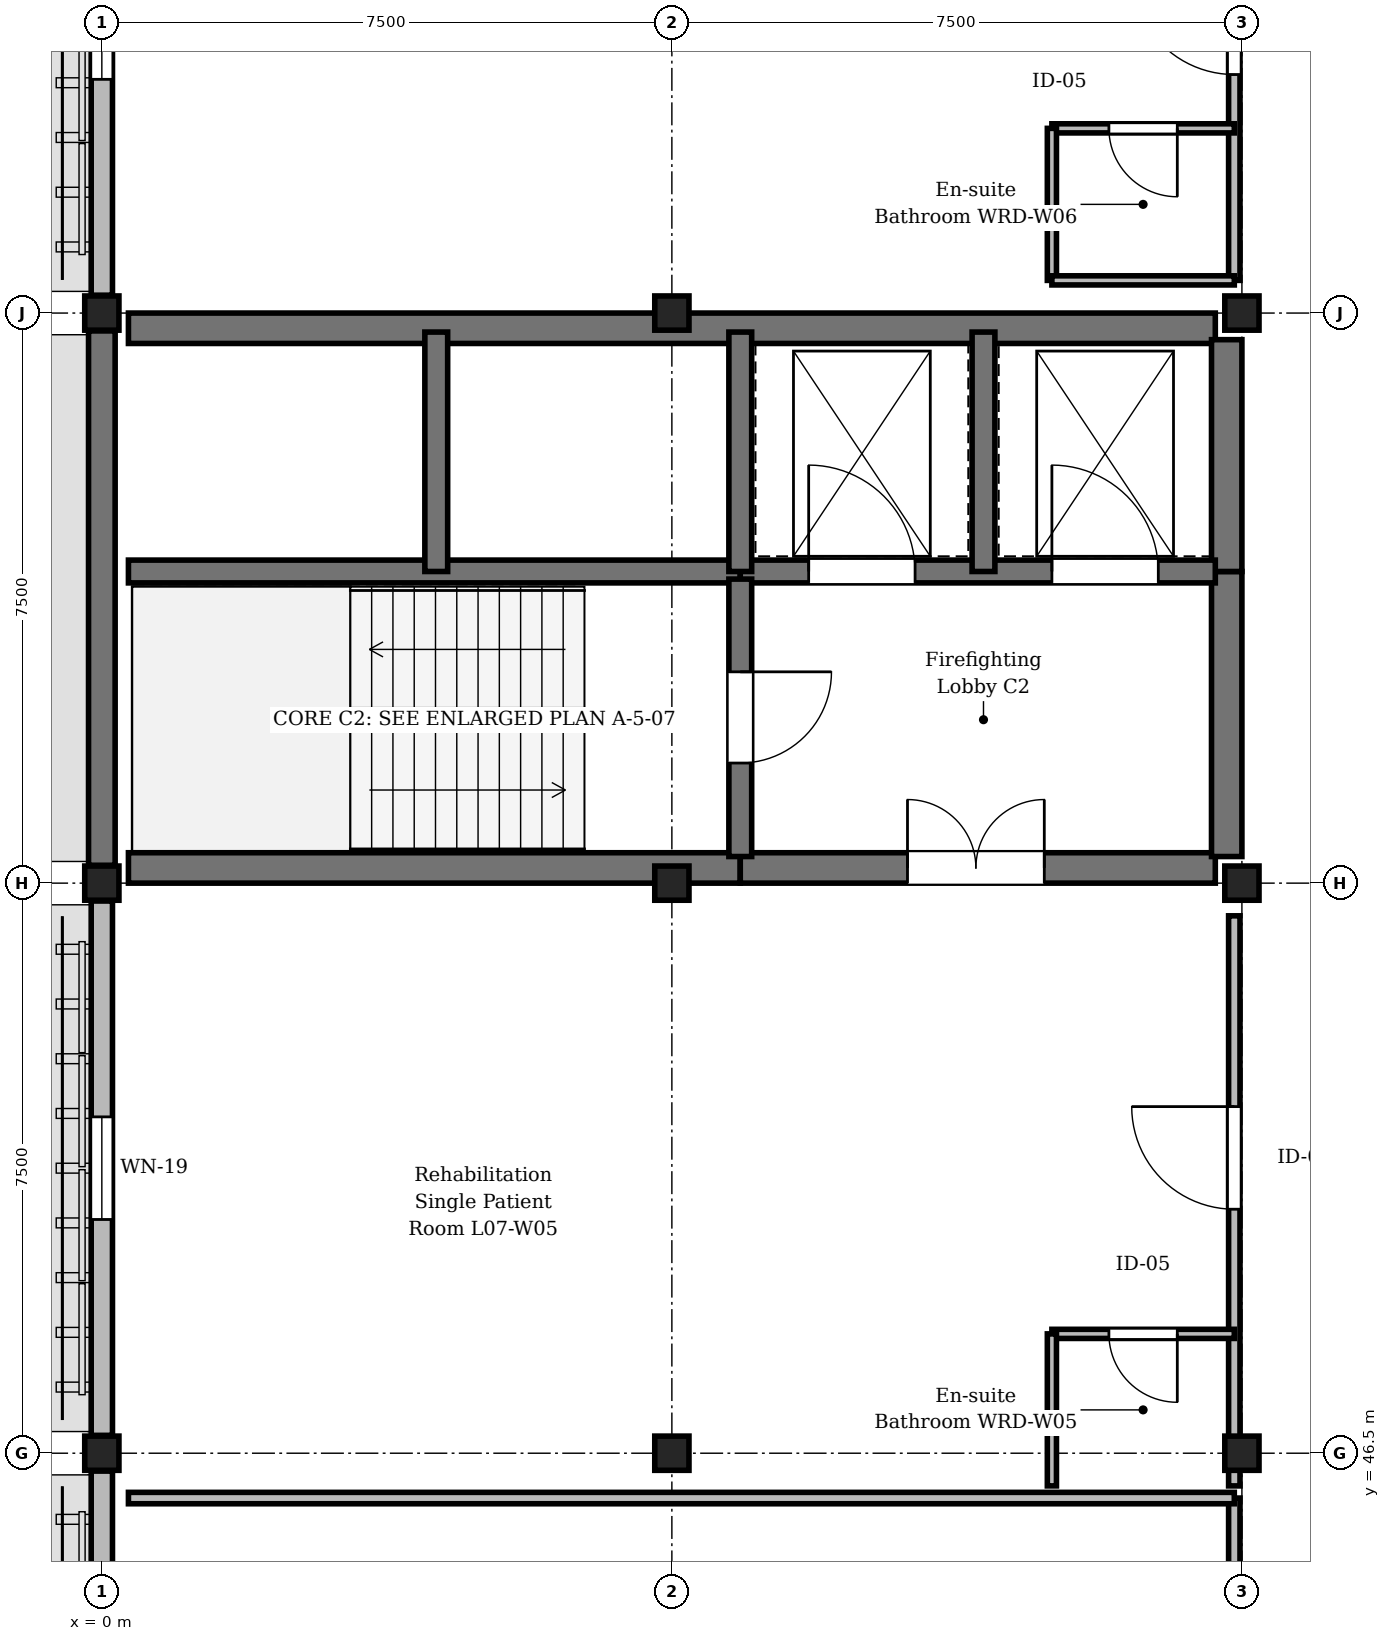
"""IFC4 building model, lengths in metres.
Left out: names, types, materials, properties, quantities, classifications, styles, units other than length and angle.
Written with IfcOpenShell. Run it as: python <this file> out.ifc"""

import sys

from ifc_helpers import new_model, si_unit, direction, frame, frame_2d, origin, origin_2d, place, context, subcontext, project, spatial, rectangle, extrude, element, fill, save


model = new_model("IFC4")
c1 = context("Model", 3, precision=1e-05, world=origin(), true_north=direction((0.0, 1.0)))
c2 = subcontext(c1, "Body", "Model", "MODEL_VIEW")
j1 = project(units=[si_unit("LENGTHUNIT", "METRE"), si_unit("PLANEANGLEUNIT", "RADIAN")], contexts=[c1])
p1 = place(None, origin())
s1 = spatial("IfcSite", under=j1, at=p1, CompositionType="ELEMENT")
p2 = place(p1, origin())
s2 = spatial("IfcBuilding", under=s1, at=p2, CompositionType="ELEMENT")
p3 = place(p2, frame((0.0, 0.0, 30.0)))
s3 = spatial("IfcBuildingStorey", under=s2, at=p3, CompositionType="ELEMENT", Elevation=30.0)
for number, where, z_axis, x_axis in (
    (1, (0.0, 46.5, 0.0), (0.0, 0.0, 1.0), (1.0, 0.0, 0.0)),
    (2, (0.0, 54.0, 0.0), (0.0, 0.0, 1.0), (1.0, 0.0, 0.0)),
    (3, (0.0, 61.5, 0.0), (0.0, 0.0, 1.0), (1.0, 0.0, 0.0)),
    (4, (7.5, 46.5, 0.0), (0.0, 0.0, 1.0), (1.0, 0.0, 0.0)),
    (5, (7.5, 54.0, 0.0), (0.0, 0.0, 1.0), (1.0, 0.0, 0.0)),
    (6, (7.5, 61.5, 0.0), (0.0, 0.0, 1.0), (1.0, 0.0, 0.0)),
    (7, (15.0, 46.5, 0.0), (0.0, 0.0, 1.0), (1.0, 0.0, 0.0)),
    (8, (15.0, 54.0, 0.0), (0.0, 0.0, 1.0), (1.0, 0.0, 0.0)),
    (9, (15.0, 61.5, 0.0), (0.0, 0.0, 1.0), (1.0, 0.0, 0.0)),
):
    element("IfcColumn", number, at=place(p3, frame(where, z_axis=z_axis, x_axis=x_axis)), inside=s3, PredefinedType="COLUMN", context=c2, shape_type="SweptSolid", body=[
        extrude(rectangle(XDim=0.45, YDim=0.45, at=origin_2d()), origin(), (0.0, 0.0, 1.0), 4.05),
    ])
p4 = place(p3, frame((0.0, 39.235, 0.0), z_axis=(0.0, 0.0, 1.0), x_axis=(0.0, 1.0, 0.0)))
e10 = element("IfcWall", 10, at=p4, inside=s3, PredefinedType="STANDARD", context=c2, shape_type="SweptSolid", body=[
    extrude(rectangle(XDim=7.03, YDim=0.28, at=frame_2d((3.515, 0.0))), origin(), (0.0, 0.0, 1.0), 3.83),
])
p5 = place(p4, frame((2.69, 0.0, 0.85)))
e11 = element("IfcOpeningElement", 11, at=p5, cuts=e10, PredefinedType="OPENING", context=c2, shape_type="SweptSolid", body=[
    extrude(rectangle(XDim=1.65, YDim=2.25, at=frame_2d((0.825, 1.125))), frame((0.0, 0.15, 0.0), z_axis=(0.0, -1.0, 0.0), x_axis=(1.0, 0.0, 0.0)), (0.0, 0.0, 1.0), 0.3),
])
p6 = place(p3, frame((0.0, 46.735, 0.0), z_axis=(0.0, 0.0, 1.0), x_axis=(0.0, 1.0, 0.0)))
e12 = element("IfcWall", 12, at=p6, inside=s3, PredefinedType="STANDARD", context=c2, shape_type="SweptSolid", body=[
    extrude(rectangle(XDim=7.03, YDim=0.28, at=frame_2d((3.515, 0.0))), origin(), (0.0, 0.0, 1.0), 3.83),
])
p7 = place(p6, frame((2.84, 0.0, 0.85)))
e13 = element("IfcOpeningElement", 13, at=p7, cuts=e12, PredefinedType="OPENING", context=c2, shape_type="SweptSolid", body=[
    extrude(rectangle(XDim=1.35, YDim=2.25, at=frame_2d((0.675, 1.125))), frame((0.0, 0.15, 0.0), z_axis=(0.0, -1.0, 0.0), x_axis=(1.0, 0.0, 0.0)), (0.0, 0.0, 1.0), 0.3),
])
p8 = place(p3, frame((0.0, 54.235, 0.0), z_axis=(0.0, 0.0, 1.0), x_axis=(0.0, 1.0, 0.0)))
e14 = element("IfcWall", 14, at=p8, inside=s3, PredefinedType="SHEAR", context=c2, shape_type="SweptSolid", body=[
    extrude(rectangle(XDim=7.03, YDim=0.35, at=frame_2d((3.515, 0.0))), origin(), (0.0, 0.0, 1.0), 3.83),
])
p9 = place(p3, frame((0.0, 61.735, 0.0), z_axis=(0.0, 0.0, 1.0), x_axis=(0.0, 1.0, 0.0)))
e15 = element("IfcWall", 15, at=p9, inside=s3, PredefinedType="STANDARD", context=c2, shape_type="SweptSolid", body=[
    extrude(rectangle(XDim=7.03, YDim=0.28, at=frame_2d((3.515, 0.0))), origin(), (0.0, 0.0, 1.0), 3.83),
])
p10 = place(p9, frame((2.84, 0.0, 0.85)))
e16 = element("IfcOpeningElement", 16, at=p10, cuts=e15, PredefinedType="OPENING", context=c2, shape_type="SweptSolid", body=[
    extrude(rectangle(XDim=1.35, YDim=2.25, at=frame_2d((0.675, 1.125))), frame((0.0, 0.15, 0.0), z_axis=(0.0, -1.0, 0.0), x_axis=(1.0, 0.0, 0.0)), (0.0, 0.0, 1.0), 0.3),
])
p11 = place(p3, frame((0.35, 54.2, 0.0), z_axis=(0.0, 0.0, 1.0), x_axis=(1.0, 0.0, 0.0)))
e17 = element("IfcWall", 17, at=p11, inside=s3, PredefinedType="SHEAR", context=c2, shape_type="SweptSolid", body=[
    extrude(rectangle(XDim=8.05, YDim=0.4, at=frame_2d((4.025, 0.0))), origin(), (0.0, 0.0, 1.0), 3.83),
])
p12 = place(p3, frame((8.4, 54.2, 0.0), z_axis=(0.0, 0.0, 1.0), x_axis=(1.0, 0.0, 0.0)))
e18 = element("IfcWall", 18, at=p12, inside=s3, PredefinedType="SHEAR", context=c2, shape_type="SweptSolid", body=[
    extrude(rectangle(XDim=6.25, YDim=0.4, at=frame_2d((3.125, 0.0))), origin(), (0.0, 0.0, 1.0), 3.83),
])
p13 = place(p12, frame((2.2, 0.0, 0.0)))
e19 = element("IfcOpeningElement", 19, at=p13, cuts=e18, PredefinedType="OPENING", context=c2, shape_type="SweptSolid", body=[
    extrude(rectangle(XDim=1.8, YDim=2.25, at=frame_2d((0.9, 1.125))), frame((0.0, 0.21, 0.0), z_axis=(0.0, -1.0, 0.0), x_axis=(1.0, 0.0, 0.0)), (0.0, 0.0, 1.0), 0.42),
])
p14 = place(p3, frame((0.35, 61.3, 0.0), z_axis=(0.0, 0.0, 1.0), x_axis=(1.0, 0.0, 0.0)))
e20 = element("IfcWall", 20, at=p14, inside=s3, PredefinedType="SHEAR", context=c2, shape_type="SweptSolid", body=[
    extrude(rectangle(XDim=14.3, YDim=0.4, at=frame_2d((7.15, 0.0))), origin(), (0.0, 0.0, 1.0), 3.83),
])
p15 = place(p3, frame((14.8, 54.35, 0.0), z_axis=(0.0, 0.0, 1.0), x_axis=(0.0, 1.0, 0.0)))
e21 = element("IfcWall", 21, at=p15, inside=s3, PredefinedType="SHEAR", context=c2, shape_type="SweptSolid", body=[
    extrude(rectangle(XDim=3.75, YDim=0.4, at=frame_2d((1.875, 0.0))), origin(), (0.0, 0.0, 1.0), 3.83),
])
p16 = place(p3, frame((14.8, 58.1, 0.0), z_axis=(0.0, 0.0, 1.0), x_axis=(0.0, 1.0, 0.0)))
e22 = element("IfcWall", 22, at=p16, inside=s3, PredefinedType="SHEAR", context=c2, shape_type="SweptSolid", body=[
    extrude(rectangle(XDim=3.05, YDim=0.4, at=frame_2d((1.525, 0.0))), origin(), (0.0, 0.0, 1.0), 3.83),
])
p17 = place(p3, frame((0.35, 58.1, 0.0), z_axis=(0.0, 0.0, 1.0), x_axis=(1.0, 0.0, 0.0)))
e23 = element("IfcWall", 23, at=p17, inside=s3, PredefinedType="SHEAR", context=c2, shape_type="SweptSolid", body=[
    extrude(rectangle(XDim=8.05, YDim=0.3, at=frame_2d((4.025, 0.0))), origin(), (0.0, 0.0, 1.0), 3.83),
])
p18 = place(p3, frame((8.4, 58.1, 0.0), z_axis=(0.0, 0.0, 1.0), x_axis=(1.0, 0.0, 0.0)))
e24 = element("IfcWall", 24, at=p18, inside=s3, PredefinedType="SHEAR", context=c2, shape_type="SweptSolid", body=[
    extrude(rectangle(XDim=6.25, YDim=0.3, at=frame_2d((3.125, 0.0))), origin(), (0.0, 0.0, 1.0), 3.83),
])
p19 = place(p18, frame((0.9, 0.0, 0.0)))
e25 = element("IfcOpeningElement", 25, at=p19, cuts=e24, PredefinedType="OPENING", context=c2, shape_type="SweptSolid", body=[
    extrude(rectangle(XDim=1.4, YDim=2.25, at=frame_2d((0.7, 1.125))), frame((0.0, 0.16, 0.0), z_axis=(0.0, -1.0, 0.0), x_axis=(1.0, 0.0, 0.0)), (0.0, 0.0, 1.0), 0.32),
])
p20 = place(p18, frame((4.1, 0.0, 0.0)))
e26 = element("IfcOpeningElement", 26, at=p20, cuts=e24, PredefinedType="OPENING", context=c2, shape_type="SweptSolid", body=[
    extrude(rectangle(XDim=1.4, YDim=2.25, at=frame_2d((0.7, 1.125))), frame((0.0, 0.16, 0.0), z_axis=(0.0, -1.0, 0.0), x_axis=(1.0, 0.0, 0.0)), (0.0, 0.0, 1.0), 0.32),
])
p21 = place(p3, frame((8.4, 58.0, 0.0), z_axis=(0.0, 0.0, 1.0), x_axis=(0.0, -1.0, 0.0)))
e27 = element("IfcWall", 27, at=p21, inside=s3, PredefinedType="SHEAR", context=c2, shape_type="SweptSolid", body=[
    extrude(rectangle(XDim=3.65, YDim=0.3, at=frame_2d((1.825, 0.0))), origin(), (0.0, 0.0, 1.0), 3.83),
])
p22 = place(p21, frame((1.22, 0.0, 0.0)))
e28 = element("IfcOpeningElement", 28, at=p22, cuts=e27, PredefinedType="OPENING", context=c2, shape_type="SweptSolid", body=[
    extrude(rectangle(XDim=1.2, YDim=2.25, at=frame_2d((0.6, 1.125))), frame((0.0, 0.16, 0.0), z_axis=(0.0, -1.0, 0.0), x_axis=(1.0, 0.0, 0.0)), (0.0, 0.0, 1.0), 0.32),
])
for number, where, z_axis, x_axis in (
    (29, (4.4, 58.1, 0.0), (0.0, 0.0, 1.0), (0.0, 1.0, 0.0)),
    (30, (8.4, 58.1, 0.0), (0.0, 0.0, 1.0), (0.0, 1.0, 0.0)),
    (31, (11.6, 58.1, 0.0), (0.0, 0.0, 1.0), (0.0, 1.0, 0.0)),
):
    element("IfcWall", number, at=place(p3, frame(where, z_axis=z_axis, x_axis=x_axis)), inside=s3, PredefinedType="SHEAR", context=c2, shape_type="SweptSolid", body=[
        extrude(rectangle(XDim=3.15, YDim=0.3, at=frame_2d((1.575, 0.0))), origin(), (0.0, 0.0, 1.0), 3.83),
    ])
p23 = place(p3, frame((14.9, 38.41, 0.0), z_axis=(0.0, 0.0, 1.0), x_axis=(0.0, 1.0, 0.0)))
e32 = element("IfcWall", 32, at=p23, inside=s3, PredefinedType="PARTITIONING", context=c2, shape_type="SweptSolid", body=[
    extrude(rectangle(XDim=7.5, YDim=0.15, at=frame_2d((3.75, 0.0))), origin(), (0.0, 0.0, 1.0), 3.815),
])
p24 = place(p23, frame((3.64, 0.0, 0.0)))
e33 = element("IfcOpeningElement", 33, at=p24, cuts=e32, PredefinedType="OPENING", context=c2, shape_type="SweptSolid", body=[
    extrude(rectangle(XDim=1.35, YDim=2.25, at=frame_2d((0.675, 1.125))), frame((0.0, 0.085, 0.0), z_axis=(0.0, -1.0, 0.0), x_axis=(1.0, 0.0, 0.0)), (0.0, 0.0, 1.0), 0.17),
])
p25 = place(p3, frame((14.9, 46.07, 0.0), z_axis=(0.0, 0.0, 1.0), x_axis=(0.0, 1.0, 0.0)))
e34 = element("IfcWall", 34, at=p25, inside=s3, PredefinedType="PARTITIONING", context=c2, shape_type="SweptSolid", body=[
    extrude(rectangle(XDim=7.5, YDim=0.15, at=frame_2d((3.75, 0.0))), origin(), (0.0, 0.0, 1.0), 3.815),
])
p26 = place(p25, frame((3.64, 0.0, 0.0)))
e35 = element("IfcOpeningElement", 35, at=p26, cuts=e34, PredefinedType="OPENING", context=c2, shape_type="SweptSolid", body=[
    extrude(rectangle(XDim=1.35, YDim=2.25, at=frame_2d((0.675, 1.125))), frame((0.0, 0.085, 0.0), z_axis=(0.0, -1.0, 0.0), x_axis=(1.0, 0.0, 0.0)), (0.0, 0.0, 1.0), 0.17),
])
p27 = place(p3, frame((14.9, 48.07, 0.0), z_axis=(0.0, 0.0, 1.0), x_axis=(-1.0, 0.0, 0.0)))
e36 = element("IfcWall", 36, at=p27, inside=s3, PredefinedType="PARTITIONING", context=c2, shape_type="SweptSolid", body=[
    extrude(rectangle(XDim=2.4, YDim=0.12, at=frame_2d((1.2, 0.0))), origin(), (0.0, 0.0, 1.0), 3.815),
])
p28 = place(p27, frame((0.75, 0.0, 0.0)))
e37 = element("IfcOpeningElement", 37, at=p28, cuts=e36, PredefinedType="OPENING", context=c2, shape_type="SweptSolid", body=[
    extrude(rectangle(XDim=0.9, YDim=2.1, at=frame_2d((0.45, 1.05))), frame((0.0, 0.07, 0.0), z_axis=(0.0, -1.0, 0.0), x_axis=(1.0, 0.0, 0.0)), (0.0, 0.0, 1.0), 0.14),
])
p29 = place(p3, frame((12.5, 46.07, 0.0), z_axis=(0.0, 0.0, 1.0), x_axis=(0.0, 1.0, 0.0)))
e38 = element("IfcWall", 38, at=p29, inside=s3, PredefinedType="PARTITIONING", context=c2, shape_type="SweptSolid", body=[
    extrude(rectangle(XDim=2.0, YDim=0.12, at=frame_2d((1.0, 0.0))), origin(), (0.0, 0.0, 1.0), 3.815),
])
p30 = place(p3, frame((14.9, 61.93, 0.0), z_axis=(0.0, 0.0, 1.0), x_axis=(0.0, 1.0, 0.0)))
e39 = element("IfcWall", 39, at=p30, inside=s3, PredefinedType="PARTITIONING", context=c2, shape_type="SweptSolid", body=[
    extrude(rectangle(XDim=14.14, YDim=0.15, at=frame_2d((7.07, 0.0))), origin(), (0.0, 0.0, 1.0), 3.815),
])
p31 = place(p30, frame((2.708, 0.0, 0.0)))
e40 = element("IfcOpeningElement", 40, at=p31, cuts=e39, PredefinedType="OPENING", context=c2, shape_type="SweptSolid", body=[
    extrude(rectangle(XDim=1.35, YDim=2.25, at=frame_2d((0.675, 1.125))), frame((0.0, 0.085, 0.0), z_axis=(0.0, -1.0, 0.0), x_axis=(1.0, 0.0, 0.0)), (0.0, 0.0, 1.0), 0.17),
])
p32 = place(p3, frame((14.9, 63.93, 0.0), z_axis=(0.0, 0.0, 1.0), x_axis=(-1.0, 0.0, 0.0)))
e41 = element("IfcWall", 41, at=p32, inside=s3, PredefinedType="PARTITIONING", context=c2, shape_type="SweptSolid", body=[
    extrude(rectangle(XDim=2.4, YDim=0.12, at=frame_2d((1.2, 0.0))), origin(), (0.0, 0.0, 1.0), 3.815),
])
p33 = place(p32, frame((0.75, 0.0, 0.0)))
e42 = element("IfcOpeningElement", 42, at=p33, cuts=e41, PredefinedType="OPENING", context=c2, shape_type="SweptSolid", body=[
    extrude(rectangle(XDim=0.9, YDim=2.1, at=frame_2d((0.45, 1.05))), frame((0.0, 0.07, 0.0), z_axis=(0.0, -1.0, 0.0), x_axis=(1.0, 0.0, 0.0)), (0.0, 0.0, 1.0), 0.14),
])
p34 = place(p3, frame((12.5, 61.93, 0.0), z_axis=(0.0, 0.0, 1.0), x_axis=(0.0, 1.0, 0.0)))
e43 = element("IfcWall", 43, at=p34, inside=s3, PredefinedType="PARTITIONING", context=c2, shape_type="SweptSolid", body=[
    extrude(rectangle(XDim=2.0, YDim=0.12, at=frame_2d((1.0, 0.0))), origin(), (0.0, 0.0, 1.0), 3.815),
])
p35 = place(p3, frame((0.35, 45.91, 0.0), z_axis=(0.0, 0.0, 1.0), x_axis=(1.0, 0.0, 0.0)))
e44 = element("IfcWall", 44, at=p35, inside=s3, PredefinedType="PARTITIONING", context=c2, shape_type="SweptSolid", body=[
    extrude(rectangle(XDim=14.55, YDim=0.15, at=frame_2d((7.275, 0.0))), origin(), (0.0, 0.0, 1.0), 3.815),
])
p36 = place(p3, frame((12.5, 61.93, 0.0), z_axis=(0.0, 0.0, 1.0), x_axis=(1.0, 0.0, 0.0)))
e45 = element("IfcWall", 45, at=p36, inside=s3, PredefinedType="PARTITIONING", context=c2, shape_type="SweptSolid", body=[
    extrude(rectangle(XDim=2.4, YDim=0.12, at=frame_2d((1.2, 0.0))), origin(), (0.0, 0.0, 1.0), 3.815),
])
p37 = place(p7, origin())
e46 = element("IfcWindow", 46, at=p37, inside=s3, PartitioningType="SINGLE_PANEL", PredefinedType="WINDOW", context=c2, shape_type="SweptSolid", body=[
    extrude(rectangle(XDim=1.35, YDim=2.25, at=frame_2d((0.675, 1.125))), frame((0.0, 0.03, 0.0), z_axis=(0.0, -1.0, 0.0), x_axis=(1.0, 0.0, 0.0)), (0.0, 0.0, 1.0), 0.06),
])
fill(e13, e46)
p38 = place(p10, origin())
e47 = element("IfcWindow", 47, at=p38, inside=s3, PartitioningType="SINGLE_PANEL", PredefinedType="WINDOW", context=c2, shape_type="SweptSolid", body=[
    extrude(rectangle(XDim=1.35, YDim=2.25, at=frame_2d((0.675, 1.125))), frame((0.0, 0.03, 0.0), z_axis=(0.0, -1.0, 0.0), x_axis=(1.0, 0.0, 0.0)), (0.0, 0.0, 1.0), 0.06),
])
fill(e16, e47)
p39 = place(p13, origin())
e48 = element("IfcDoor", 48, at=p39, inside=s3, OperationType="DOUBLE_DOOR_SINGLE_SWING", PredefinedType="DOOR", context=c2, shape_type="SweptSolid", body=[
    extrude(rectangle(XDim=1.8, YDim=2.25, at=frame_2d((0.9, 1.125))), frame((0.0, 0.025, 0.0), z_axis=(0.0, -1.0, 0.0), x_axis=(1.0, 0.0, 0.0)), (0.0, 0.0, 1.0), 0.05),
])
fill(e19, e48)
p40 = place(p19, origin())
e49 = element("IfcDoor", 49, at=p40, inside=s3, OperationType="DOUBLE_DOOR_SLIDING", PredefinedType="DOOR", context=c2, shape_type="SweptSolid", body=[
    extrude(rectangle(XDim=1.4, YDim=2.25, at=frame_2d((0.7, 1.125))), frame((0.0, 0.025, 0.0), z_axis=(0.0, -1.0, 0.0), x_axis=(1.0, 0.0, 0.0)), (0.0, 0.0, 1.0), 0.05),
])
fill(e25, e49)
p41 = place(p20, origin())
e50 = element("IfcDoor", 50, at=p41, inside=s3, OperationType="DOUBLE_DOOR_SLIDING", PredefinedType="DOOR", context=c2, shape_type="SweptSolid", body=[
    extrude(rectangle(XDim=1.4, YDim=2.25, at=frame_2d((0.7, 1.125))), frame((0.0, 0.025, 0.0), z_axis=(0.0, -1.0, 0.0), x_axis=(1.0, 0.0, 0.0)), (0.0, 0.0, 1.0), 0.05),
])
fill(e26, e50)
p42 = place(p22, origin())
e51 = element("IfcDoor", 51, at=p42, inside=s3, OperationType="SINGLE_SWING_LEFT", PredefinedType="DOOR", context=c2, shape_type="SweptSolid", body=[
    extrude(rectangle(XDim=1.2, YDim=2.25, at=frame_2d((0.6, 1.125))), frame((0.0, 0.025, 0.0), z_axis=(0.0, -1.0, 0.0), x_axis=(1.0, 0.0, 0.0)), (0.0, 0.0, 1.0), 0.05),
])
fill(e28, e51)
p43 = place(p26, origin())
e52 = element("IfcDoor", 52, at=p43, inside=s3, OperationType="SINGLE_SWING_RIGHT", PredefinedType="DOOR", context=c2, shape_type="SweptSolid", body=[
    extrude(rectangle(XDim=1.35, YDim=2.25, at=frame_2d((0.675, 1.125))), frame((0.0, 0.025, 0.0), z_axis=(0.0, -1.0, 0.0), x_axis=(1.0, 0.0, 0.0)), (0.0, 0.0, 1.0), 0.05),
])
fill(e35, e52)
p44 = place(p28, origin())
e53 = element("IfcDoor", 53, at=p44, inside=s3, OperationType="SINGLE_SWING_LEFT", PredefinedType="DOOR", context=c2, shape_type="SweptSolid", body=[
    extrude(rectangle(XDim=0.9, YDim=2.1, at=frame_2d((0.45, 1.05))), frame((0.0, 0.025, 0.0), z_axis=(0.0, -1.0, 0.0), x_axis=(1.0, 0.0, 0.0)), (0.0, 0.0, 1.0), 0.05),
])
fill(e37, e53)
p45 = place(p31, origin())
e54 = element("IfcDoor", 54, at=p45, inside=s3, OperationType="SINGLE_SWING_RIGHT", PredefinedType="DOOR", context=c2, shape_type="SweptSolid", body=[
    extrude(rectangle(XDim=1.35, YDim=2.25, at=frame_2d((0.675, 1.125))), frame((0.0, 0.025, 0.0), z_axis=(0.0, -1.0, 0.0), x_axis=(1.0, 0.0, 0.0)), (0.0, 0.0, 1.0), 0.05),
])
fill(e40, e54)
p46 = place(p33, origin())
e55 = element("IfcDoor", 55, at=p46, inside=s3, OperationType="SINGLE_SWING_LEFT", PredefinedType="DOOR", context=c2, shape_type="SweptSolid", body=[
    extrude(rectangle(XDim=0.9, YDim=2.1, at=frame_2d((0.45, 1.05))), frame((0.0, 0.025, 0.0), z_axis=(0.0, -1.0, 0.0), x_axis=(1.0, 0.0, 0.0)), (0.0, 0.0, 1.0), 0.05),
])
fill(e42, e55)
save(model, sys.argv[1])
